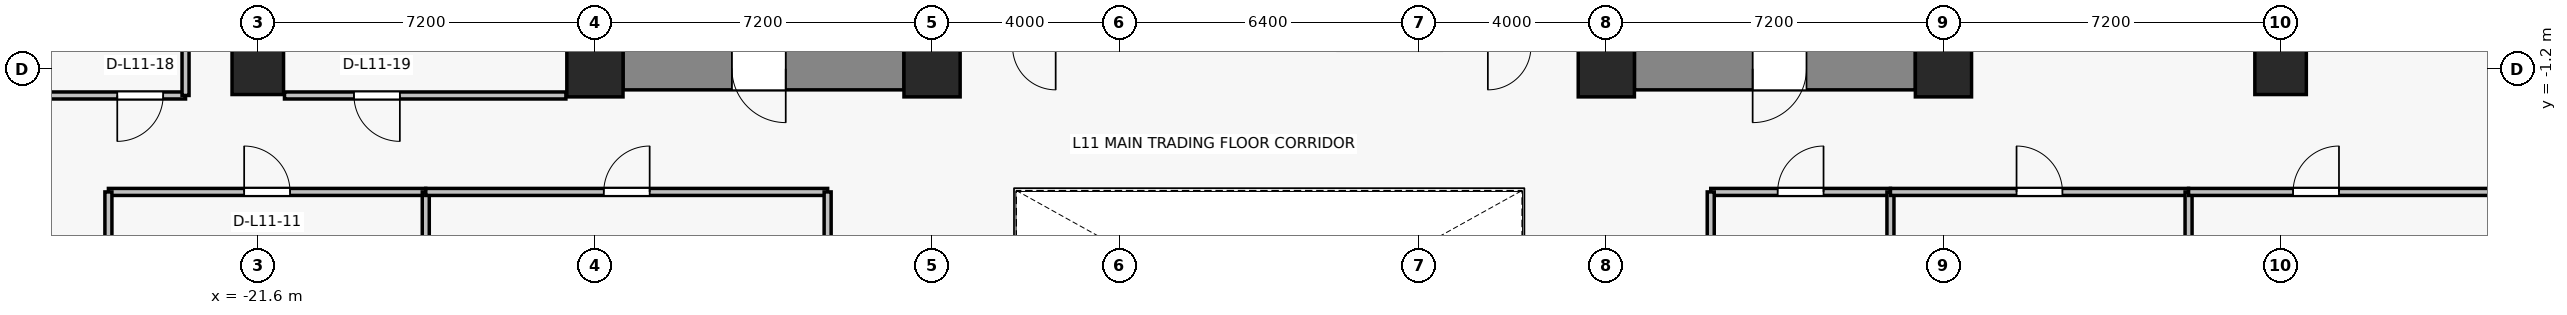
"""IFC4 building model, lengths in metres.
Left out: names, types, materials, properties, quantities, classifications, styles, units other than length and angle.
Written with IfcOpenShell. Run it as: python <this file> out.ifc"""

import sys

from ifc_helpers import new_model, si_unit, direction, frame, frame_2d, origin, origin_2d, place, context, subcontext, project, spatial, rectangle, extrude, source, transform, mapped, element, fill, save


model = new_model("IFC4")
c1 = context("Model", 3, precision=1e-05, world=origin(), true_north=direction((0.0, 1.0)))
c2 = subcontext(c1, "Body", "Model", "MODEL_VIEW")
j1 = project(units=[si_unit("LENGTHUNIT", "METRE"), si_unit("PLANEANGLEUNIT", "RADIAN")], contexts=[c1])
p1 = place(None, origin())
s1 = spatial("IfcSite", under=j1, at=p1, CompositionType="ELEMENT")
p2 = place(p1, origin())
s2 = spatial("IfcBuilding", under=s1, at=p2, CompositionType="ELEMENT")
p3 = place(p2, frame((0.0, 0.0, 43.9)))
s3 = spatial("IfcBuildingStorey", under=s2, at=p3, CompositionType="ELEMENT", Elevation=43.9)
for number, where, z_axis, x_axis in (
    (1, (-14.4, -1.2, 0.0), (0.0, 0.0, 1.0), (1.0, 0.0, 0.0)),
    (2, (-7.2, -1.2, 0.0), (0.0, 0.0, 1.0), (1.0, 0.0, 0.0)),
    (3, (7.2, -1.2, 0.0), (0.0, 0.0, 1.0), (1.0, 0.0, 0.0)),
    (4, (14.4, -1.2, 0.0), (0.0, 0.0, 1.0), (1.0, 0.0, 0.0)),
):
    element("IfcColumn", number, at=place(p3, frame(where, z_axis=z_axis, x_axis=x_axis)), inside=s3, PredefinedType="COLUMN", context=c2, shape_type="SweptSolid", body=[
        extrude(rectangle(XDim=1.2, YDim=1.2, at=origin_2d()), origin(), (0.0, 0.0, 1.0), 3.3),
    ])
for number, where, z_axis, x_axis in (
    (5, (-21.6, -1.2, 0.0), (0.0, 0.0, 1.0), (1.0, 0.0, 0.0)),
    (6, (21.6, -1.2, 0.0), (0.0, 0.0, 1.0), (1.0, 0.0, 0.0)),
):
    element("IfcColumn", number, at=place(p3, frame(where, z_axis=z_axis, x_axis=x_axis)), inside=s3, PredefinedType="COLUMN", context=c2, shape_type="SweptSolid", body=[
        extrude(rectangle(XDim=1.1, YDim=1.1, at=origin_2d()), origin(), (0.0, 0.0, 1.0), 3.3),
    ])
p4 = place(p3, frame((-7.8, -1.2, 0.0), z_axis=(0.0, 0.0, 1.0), x_axis=(-1.0, 0.0, 0.0)))
e7 = element("IfcWall", 7, at=p4, inside=s3, PredefinedType="SHEAR", context=c2, shape_type="SweptSolid", body=[
    extrude(rectangle(XDim=6.0, YDim=0.9, at=frame_2d((3.0, 0.0))), origin(), (0.0, 0.0, 1.0), 3.075),
])
p5 = place(p4, frame((2.525, 0.0, 0.0)))
e8 = element("IfcOpeningElement", 8, at=p5, cuts=e7, PredefinedType="OPENING", context=c2, shape_type="SweptSolid", body=[
    extrude(rectangle(XDim=1.15, YDim=2.15, at=frame_2d((0.575, 1.075))), frame((0.0, 0.46, 0.0), z_axis=(0.0, -1.0, 0.0), x_axis=(1.0, 0.0, 0.0)), (0.0, 0.0, 1.0), 0.92),
])
p6 = place(p3, frame((13.8, -1.2, 0.0), z_axis=(0.0, 0.0, 1.0), x_axis=(-1.0, 0.0, 0.0)))
e9 = element("IfcWall", 9, at=p6, inside=s3, PredefinedType="SHEAR", context=c2, shape_type="SweptSolid", body=[
    extrude(rectangle(XDim=6.0, YDim=0.9, at=frame_2d((3.0, 0.0))), origin(), (0.0, 0.0, 1.0), 3.075),
])
p7 = place(p6, frame((2.325, 0.0, 0.0)))
e10 = element("IfcOpeningElement", 10, at=p7, cuts=e9, PredefinedType="OPENING", context=c2, shape_type="SweptSolid", body=[
    extrude(rectangle(XDim=1.15, YDim=2.15, at=frame_2d((0.575, 1.075))), frame((0.0, 0.46, 0.0), z_axis=(0.0, -1.0, 0.0), x_axis=(1.0, 0.0, 0.0)), (0.0, 0.0, 1.0), 0.92),
])
p8 = place(p3, frame((-24.79, -3.83, 0.0), z_axis=(0.0, 0.0, 1.0), x_axis=(1.0, 0.0, 0.0)))
e11 = element("IfcWall", 11, at=p8, inside=s3, PredefinedType="PARTITIONING", context=c2, shape_type="SweptSolid", body=[
    extrude(rectangle(XDim=6.778, YDim=0.15, at=frame_2d((3.389, 0.0))), origin(), (0.0, 0.0, 1.0), 2.465),
])
p9 = place(p8, frame((2.899, 0.0, 0.0)))
e12 = element("IfcOpeningElement", 12, at=p9, cuts=e11, PredefinedType="OPENING", context=c2, shape_type="SweptSolid", body=[
    extrude(rectangle(XDim=0.98, YDim=2.15, at=frame_2d((0.49, 1.075))), frame((0.0, 0.085, 0.0), z_axis=(0.0, -1.0, 0.0), x_axis=(1.0, 0.0, 0.0)), (0.0, 0.0, 1.0), 0.17),
])
for number, where, z_axis, x_axis in (
    (13, (-24.79, -8.12, 0.0), (0.0, 0.0, 1.0), (0.0, 1.0, 0.0)),
    (14, (-18.012, -3.83, 0.0), (0.0, 0.0, 1.0), (0.0, -1.0, 0.0)),
):
    element("IfcWall", number, at=place(p3, frame(where, z_axis=z_axis, x_axis=x_axis)), inside=s3, PredefinedType="PARTITIONING", context=c2, shape_type="SweptSolid", body=[
        extrude(rectangle(XDim=4.29, YDim=0.15, at=frame_2d((2.145, 0.0))), origin(), (0.0, 0.0, 1.0), 2.565),
    ])
p10 = place(p3, frame((-18.012, -3.83, 0.0), z_axis=(0.0, 0.0, 1.0), x_axis=(1.0, 0.0, 0.0)))
e15 = element("IfcWall", 15, at=p10, inside=s3, PredefinedType="PARTITIONING", context=c2, shape_type="SweptSolid", body=[
    extrude(rectangle(XDim=8.583, YDim=0.15, at=frame_2d((4.291, 0.0))), origin(), (0.0, 0.0, 1.0), 2.465),
])
p11 = place(p10, frame((3.802, 0.0, 0.0)))
e16 = element("IfcOpeningElement", 16, at=p11, cuts=e15, PredefinedType="OPENING", context=c2, shape_type="SweptSolid", body=[
    extrude(rectangle(XDim=0.98, YDim=2.15, at=frame_2d((0.49, 1.075))), frame((0.0, 0.085, 0.0), z_axis=(0.0, -1.0, 0.0), x_axis=(1.0, 0.0, 0.0)), (0.0, 0.0, 1.0), 0.17),
])
p12 = place(p3, frame((-9.43, -3.83, 0.0), z_axis=(0.0, 0.0, 1.0), x_axis=(0.0, -1.0, 0.0)))
e17 = element("IfcWall", 17, at=p12, inside=s3, PredefinedType="PARTITIONING", context=c2, shape_type="SweptSolid", body=[
    extrude(rectangle(XDim=4.29, YDim=0.15, at=frame_2d((2.145, 0.0))), origin(), (0.0, 0.0, 1.0), 2.565),
])
p13 = place(p3, frame((9.43, -3.83, 0.0), z_axis=(0.0, 0.0, 1.0), x_axis=(1.0, 0.0, 0.0)))
e18 = element("IfcWall", 18, at=p13, inside=s3, PredefinedType="PARTITIONING", context=c2, shape_type="SweptSolid", body=[
    extrude(rectangle(XDim=3.838, YDim=0.15, at=frame_2d((1.919, 0.0))), origin(), (0.0, 0.0, 1.0), 3.075),
])
p14 = place(p13, frame((1.429, 0.0, 0.0)))
e19 = element("IfcOpeningElement", 19, at=p14, cuts=e18, PredefinedType="OPENING", context=c2, shape_type="SweptSolid", body=[
    extrude(rectangle(XDim=0.98, YDim=2.15, at=frame_2d((0.49, 1.075))), frame((0.0, 0.085, 0.0), z_axis=(0.0, -1.0, 0.0), x_axis=(1.0, 0.0, 0.0)), (0.0, 0.0, 1.0), 0.17),
])
for number, where, z_axis, x_axis in (
    (20, (9.43, -8.12, 0.0), (0.0, 0.0, 1.0), (0.0, 1.0, 0.0)),
    (21, (13.268, -3.83, 0.0), (0.0, 0.0, 1.0), (0.0, -1.0, 0.0)),
):
    element("IfcWall", number, at=place(p3, frame(where, z_axis=z_axis, x_axis=x_axis)), inside=s3, PredefinedType="PARTITIONING", context=c2, shape_type="SweptSolid", body=[
        extrude(rectangle(XDim=4.29, YDim=0.15, at=frame_2d((2.145, 0.0))), origin(), (0.0, 0.0, 1.0), 2.565),
    ])
p15 = place(p3, frame((13.268, -3.83, 0.0), z_axis=(0.0, 0.0, 1.0), x_axis=(1.0, 0.0, 0.0)))
e22 = element("IfcWall", 22, at=p15, inside=s3, PredefinedType="PARTITIONING", context=c2, shape_type="SweptSolid", body=[
    extrude(rectangle(XDim=6.367, YDim=0.15, at=frame_2d((3.183, 0.0))), origin(), (0.0, 0.0, 1.0), 2.465),
])
p16 = place(p15, frame((2.693, 0.0, 0.0)))
e23 = element("IfcOpeningElement", 23, at=p16, cuts=e22, PredefinedType="OPENING", context=c2, shape_type="SweptSolid", body=[
    extrude(rectangle(XDim=0.98, YDim=2.15, at=frame_2d((0.49, 1.075))), frame((0.0, 0.085, 0.0), z_axis=(0.0, -1.0, 0.0), x_axis=(1.0, 0.0, 0.0)), (0.0, 0.0, 1.0), 0.17),
])
p17 = place(p3, frame((19.635, -3.83, 0.0), z_axis=(0.0, 0.0, 1.0), x_axis=(0.0, -1.0, 0.0)))
e24 = element("IfcWall", 24, at=p17, inside=s3, PredefinedType="PARTITIONING", context=c2, shape_type="SweptSolid", body=[
    extrude(rectangle(XDim=4.29, YDim=0.15, at=frame_2d((2.145, 0.0))), origin(), (0.0, 0.0, 1.0), 2.565),
])
p18 = place(p3, frame((19.635, -3.83, 0.0), z_axis=(0.0, 0.0, 1.0), x_axis=(1.0, 0.0, 0.0)))
e25 = element("IfcWall", 25, at=p18, inside=s3, PredefinedType="PARTITIONING", context=c2, shape_type="SweptSolid", body=[
    extrude(rectangle(XDim=8.895, YDim=0.15, at=frame_2d((4.448, 0.0))), origin(), (0.0, 0.0, 1.0), 2.465),
])
p19 = place(p18, frame((2.232, 0.0, 0.0)))
e26 = element("IfcOpeningElement", 26, at=p19, cuts=e25, PredefinedType="OPENING", context=c2, shape_type="SweptSolid", body=[
    extrude(rectangle(XDim=0.98, YDim=2.15, at=frame_2d((0.49, 1.075))), frame((0.0, 0.085, 0.0), z_axis=(0.0, -1.0, 0.0), x_axis=(1.0, 0.0, 0.0)), (0.0, 0.0, 1.0), 0.17),
])
p20 = place(p3, frame((-23.143, -1.77, 0.0), z_axis=(0.0, 0.0, 1.0), x_axis=(-1.0, 0.0, 0.0)))
e27 = element("IfcWall", 27, at=p20, inside=s3, PredefinedType="PARTITIONING", context=c2, shape_type="SweptSolid", body=[
    extrude(rectangle(XDim=5.853, YDim=0.15, at=frame_2d((2.927, 0.0))), origin(), (0.0, 0.0, 1.0), 3.075),
])
p21 = place(p20, frame((0.478, 0.0, 0.0)))
e28 = element("IfcOpeningElement", 28, at=p21, cuts=e27, PredefinedType="OPENING", context=c2, shape_type="SweptSolid", body=[
    extrude(rectangle(XDim=0.98, YDim=2.15, at=frame_2d((0.49, 1.075))), frame((0.0, 0.085, 0.0), z_axis=(0.0, -1.0, 0.0), x_axis=(1.0, 0.0, 0.0)), (0.0, 0.0, 1.0), 0.17),
])
p22 = place(p3, frame((-23.143, 13.88, 0.0), z_axis=(0.0, 0.0, 1.0), x_axis=(0.0, -1.0, 0.0)))
e29 = element("IfcWall", 29, at=p22, inside=s3, PredefinedType="PARTITIONING", context=c2, shape_type="SweptSolid", body=[
    extrude(rectangle(XDim=15.65, YDim=0.15, at=frame_2d((7.825, 0.0))), origin(), (0.0, 0.0, 1.0), 2.465),
])
p23 = place(p3, frame((-15.02, -1.77, 0.0), z_axis=(0.0, 0.0, 1.0), x_axis=(-1.0, 0.0, 0.0)))
e30 = element("IfcWall", 30, at=p23, inside=s3, PredefinedType="PARTITIONING", context=c2, shape_type="SweptSolid", body=[
    extrude(rectangle(XDim=6.01, YDim=0.15, at=frame_2d((3.005, 0.0))), origin(), (0.0, 0.0, 1.0), 3.075),
])
p24 = place(p23, frame((3.546, 0.0, 0.0)))
e31 = element("IfcOpeningElement", 31, at=p24, cuts=e30, PredefinedType="OPENING", context=c2, shape_type="SweptSolid", body=[
    extrude(rectangle(XDim=0.98, YDim=2.15, at=frame_2d((0.49, 1.075))), frame((0.0, 0.085, 0.0), z_axis=(0.0, -1.0, 0.0), x_axis=(1.0, 0.0, 0.0)), (0.0, 0.0, 1.0), 0.17),
])
m1 = source(origin(), c2, "Body", "SweptSolid", [
    extrude(rectangle(XDim=1.15, YDim=2.15, at=frame_2d((0.575, 1.075))), frame((0.0, 0.025, 0.0), z_axis=(0.0, -1.0, 0.0), x_axis=(1.0, 0.0, 0.0)), (0.0, 0.0, 1.0), 0.05),
])
p25 = place(p5, origin())
e32 = element("IfcDoor", 32, at=p25, inside=s3, OperationType="SINGLE_SWING_LEFT", PredefinedType="DOOR", context=c2, shape_type="MappedRepresentation", body=[
    mapped(m1, transform((0.0, 0.0, 0.0), x_axis=(1.0, 0.0, 0.0), y_axis=(0.0, 1.0, 0.0), z_axis=(0.0, 0.0, 1.0), scale=1.0)),
])
fill(e8, e32)
p26 = place(p7, origin())
e33 = element("IfcDoor", 33, at=p26, inside=s3, OperationType="SINGLE_SWING_RIGHT", PredefinedType="DOOR", context=c2, shape_type="MappedRepresentation", body=[
    mapped(m1, transform((0.0, 0.0, 0.0), x_axis=(1.0, 0.0, 0.0), y_axis=(0.0, 1.0, 0.0), z_axis=(0.0, 0.0, 1.0), scale=1.0)),
])
fill(e10, e33)
m2 = source(origin(), c2, "Body", "SweptSolid", [
    extrude(rectangle(XDim=0.98, YDim=2.15, at=frame_2d((0.49, 1.075))), frame((0.0, 0.025, 0.0), z_axis=(0.0, -1.0, 0.0), x_axis=(1.0, 0.0, 0.0)), (0.0, 0.0, 1.0), 0.05),
])
p27 = place(p9, origin())
e34 = element("IfcDoor", 34, at=p27, inside=s3, OperationType="SINGLE_SWING_LEFT", PredefinedType="DOOR", context=c2, shape_type="MappedRepresentation", body=[
    mapped(m2, transform((0.0, 0.0, 0.0), x_axis=(1.0, 0.0, 0.0), y_axis=(0.0, 1.0, 0.0), z_axis=(0.0, 0.0, 1.0), scale=1.0)),
])
fill(e12, e34)
p28 = place(p11, origin())
e35 = element("IfcDoor", 35, at=p28, inside=s3, OperationType="SINGLE_SWING_RIGHT", PredefinedType="DOOR", context=c2, shape_type="MappedRepresentation", body=[
    mapped(m2, transform((0.0, 0.0, 0.0), x_axis=(1.0, 0.0, 0.0), y_axis=(0.0, 1.0, 0.0), z_axis=(0.0, 0.0, 1.0), scale=1.0)),
])
fill(e16, e35)
p29 = place(p14, origin())
e36 = element("IfcDoor", 36, at=p29, inside=s3, OperationType="SINGLE_SWING_RIGHT", PredefinedType="DOOR", context=c2, shape_type="MappedRepresentation", body=[
    mapped(m2, transform((0.0, 0.0, 0.0), x_axis=(1.0, 0.0, 0.0), y_axis=(0.0, 1.0, 0.0), z_axis=(0.0, 0.0, 1.0), scale=1.0)),
])
fill(e19, e36)
p30 = place(p16, origin())
e37 = element("IfcDoor", 37, at=p30, inside=s3, OperationType="SINGLE_SWING_LEFT", PredefinedType="DOOR", context=c2, shape_type="MappedRepresentation", body=[
    mapped(m2, transform((0.0, 0.0, 0.0), x_axis=(1.0, 0.0, 0.0), y_axis=(0.0, 1.0, 0.0), z_axis=(0.0, 0.0, 1.0), scale=1.0)),
])
fill(e23, e37)
p31 = place(p19, origin())
e38 = element("IfcDoor", 38, at=p31, inside=s3, OperationType="SINGLE_SWING_RIGHT", PredefinedType="DOOR", context=c2, shape_type="MappedRepresentation", body=[
    mapped(m2, transform((0.0, 0.0, 0.0), x_axis=(1.0, 0.0, 0.0), y_axis=(0.0, 1.0, 0.0), z_axis=(0.0, 0.0, 1.0), scale=1.0)),
])
fill(e26, e38)
p32 = place(p21, origin())
e39 = element("IfcDoor", 39, at=p32, inside=s3, OperationType="SINGLE_SWING_RIGHT", PredefinedType="DOOR", context=c2, shape_type="MappedRepresentation", body=[
    mapped(m2, transform((0.0, 0.0, 0.0), x_axis=(1.0, 0.0, 0.0), y_axis=(0.0, 1.0, 0.0), z_axis=(0.0, 0.0, 1.0), scale=1.0)),
])
fill(e28, e39)
p33 = place(p24, origin())
e40 = element("IfcDoor", 40, at=p33, inside=s3, OperationType="SINGLE_SWING_LEFT", PredefinedType="DOOR", context=c2, shape_type="MappedRepresentation", body=[
    mapped(m2, transform((0.0, 0.0, 0.0), x_axis=(1.0, 0.0, 0.0), y_axis=(0.0, 1.0, 0.0), z_axis=(0.0, 0.0, 1.0), scale=1.0)),
])
fill(e31, e40)
save(model, sys.argv[1])
